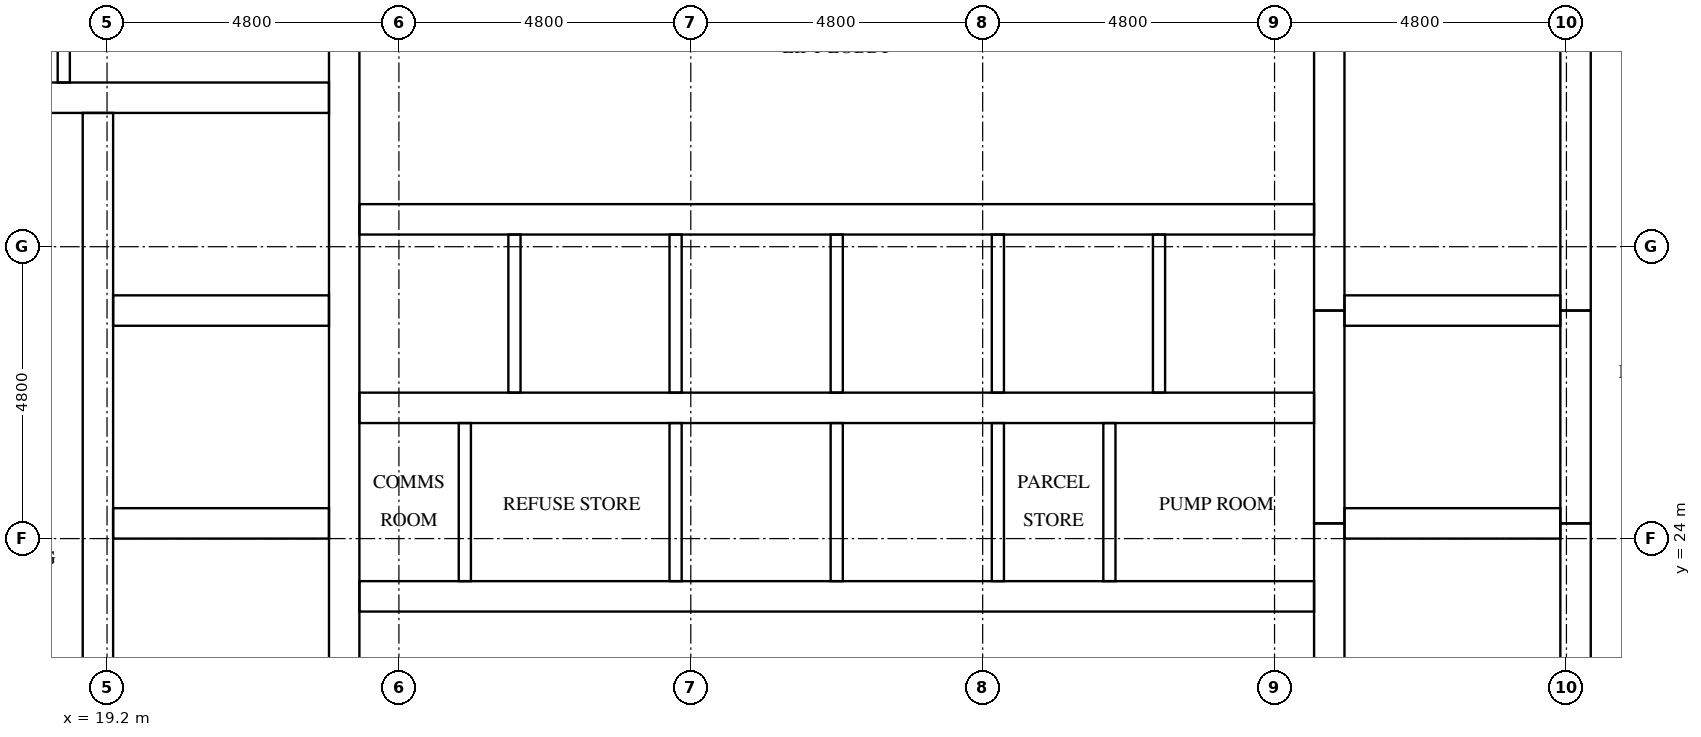
"""IFC4 building model, lengths in metres.
Left out: names, types, materials, properties, quantities, classifications, styles, units other than length and angle.
Written with IfcOpenShell. Run it as: python <this file> out.ifc"""

import sys

from ifc_helpers import new_model, si_unit, direction, frame, frame_2d, origin, place, context, subcontext, project, spatial, rectangle, extrude, element, fill, save


model = new_model("IFC4")
c1 = context("Model", 3, precision=1e-05, world=origin(), true_north=direction((0.0, 1.0)))
c2 = subcontext(c1, "Body", "Model", "MODEL_VIEW")
j1 = project(units=[si_unit("LENGTHUNIT", "METRE"), si_unit("PLANEANGLEUNIT", "RADIAN")], contexts=[c1])
p1 = place(None, origin())
s1 = spatial("IfcSite", under=j1, at=p1, CompositionType="ELEMENT")
p2 = place(p1, origin())
s2 = spatial("IfcBuilding", under=s1, at=p2, CompositionType="ELEMENT")
p3 = place(p2, frame((0.0, 0.0, 199.9)))
s3 = spatial("IfcBuildingStorey", under=s2, at=p3, CompositionType="ELEMENT", Elevation=199.9)
p4 = place(p3, frame((19.05, 15.7, 0.0), z_axis=(0.0, 0.0, 1.0), x_axis=(0.0, 1.0, 0.0)))
e1 = element("IfcWall", 1, at=p4, inside=s3, PredefinedType="SHEAR", context=c2, shape_type="SweptSolid", body=[
    extrude(rectangle(XDim=15.3, YDim=0.5, at=frame_2d((7.65, 0.0))), origin(), (0.0, 0.0, 1.0), 3.1),
])
p5 = place(p4, frame((9.75, 0.0, 0.0)))
e2 = element("IfcOpeningElement", 2, at=p5, cuts=e1, PredefinedType="OPENING", context=c2, shape_type="SweptSolid", body=[
    extrude(rectangle(XDim=1.1, YDim=2.1, at=frame_2d((0.55, 1.05))), frame((0.0, 0.26, 0.0), z_axis=(0.0, -1.0, 0.0), x_axis=(1.0, 0.0, 0.0)), (0.0, 0.0, 1.0), 0.52),
])
p6 = place(p4, frame((13.25, 0.0, 0.0)))
e3 = element("IfcOpeningElement", 3, at=p6, cuts=e1, PredefinedType="OPENING", context=c2, shape_type="SweptSolid", body=[
    extrude(rectangle(XDim=1.1, YDim=2.1, at=frame_2d((0.55, 1.05))), frame((0.0, 0.26, 0.0), z_axis=(0.0, -1.0, 0.0), x_axis=(1.0, 0.0, 0.0)), (0.0, 0.0, 1.0), 0.52),
])
p7 = place(p4, frame((0.5, 0.0, 0.0)))
e4 = element("IfcOpeningElement", 4, at=p7, cuts=e1, PredefinedType="OPENING", context=c2, shape_type="SweptSolid", body=[
    extrude(rectangle(XDim=1.2, YDim=2.1, at=frame_2d((0.6, 1.05))), frame((0.0, 0.26, 0.0), z_axis=(0.0, -1.0, 0.0), x_axis=(1.0, 0.0, 0.0)), (0.0, 0.0, 1.0), 0.52),
])
p8 = place(p3, frame((23.1, 15.7, 0.0), z_axis=(0.0, 0.0, 1.0), x_axis=(0.0, 1.0, 0.0)))
e5 = element("IfcWall", 5, at=p8, inside=s3, PredefinedType="SHEAR", context=c2, shape_type="SweptSolid", body=[
    extrude(rectangle(XDim=21.4, YDim=0.5, at=frame_2d((10.7, 0.0))), origin(), (0.0, 0.0, 1.0), 3.1),
])
p9 = place(p3, frame((39.3, 15.7, 0.0), z_axis=(0.0, 0.0, 1.0), x_axis=(0.0, 1.0, 0.0)))
e6 = element("IfcWall", 6, at=p9, inside=s3, PredefinedType="SHEAR", context=c2, shape_type="SweptSolid", body=[
    extrude(rectangle(XDim=8.55, YDim=0.5, at=frame_2d((4.275, 0.0))), origin(), (0.0, 0.0, 1.0), 3.1),
])
p10 = place(p3, frame((39.3, 24.25, 0.0), z_axis=(0.0, 0.0, 1.0), x_axis=(0.0, 1.0, 0.0)))
e7 = element("IfcWall", 7, at=p10, inside=s3, PredefinedType="SHEAR", context=c2, shape_type="SweptSolid", body=[
    extrude(rectangle(XDim=3.5, YDim=0.5, at=frame_2d((1.75, 0.0))), origin(), (0.0, 0.0, 1.0), 3.1),
])
p11 = place(p3, frame((39.3, 27.75, 0.0), z_axis=(0.0, 0.0, 1.0), x_axis=(0.0, 1.0, 0.0)))
e8 = element("IfcWall", 8, at=p11, inside=s3, PredefinedType="SHEAR", context=c2, shape_type="SweptSolid", body=[
    extrude(rectangle(XDim=9.35, YDim=0.5, at=frame_2d((4.675, 0.0))), origin(), (0.0, 0.0, 1.0), 3.1),
])
p12 = place(p3, frame((43.35, 15.7, 0.0), z_axis=(0.0, 0.0, 1.0), x_axis=(0.0, 1.0, 0.0)))
e9 = element("IfcWall", 9, at=p12, inside=s3, PredefinedType="SHEAR", context=c2, shape_type="SweptSolid", body=[
    extrude(rectangle(XDim=8.55, YDim=0.5, at=frame_2d((4.275, 0.0))), origin(), (0.0, 0.0, 1.0), 3.1),
])
p13 = place(p12, frame((0.5, 0.0, 0.0)))
e10 = element("IfcOpeningElement", 10, at=p13, cuts=e9, PredefinedType="OPENING", context=c2, shape_type="SweptSolid", body=[
    extrude(rectangle(XDim=1.2, YDim=2.1, at=frame_2d((0.6, 1.05))), frame((0.0, 0.26, 0.0), z_axis=(0.0, -1.0, 0.0), x_axis=(1.0, 0.0, 0.0)), (0.0, 0.0, 1.0), 0.52),
])
p14 = place(p3, frame((43.35, 24.25, 0.0), z_axis=(0.0, 0.0, 1.0), x_axis=(0.0, 1.0, 0.0)))
e11 = element("IfcWall", 11, at=p14, inside=s3, PredefinedType="SHEAR", context=c2, shape_type="SweptSolid", body=[
    extrude(rectangle(XDim=3.5, YDim=0.5, at=frame_2d((1.75, 0.0))), origin(), (0.0, 0.0, 1.0), 3.1),
])
p15 = place(p14, frame((1.2, 0.0, 0.0)))
e12 = element("IfcOpeningElement", 12, at=p15, cuts=e11, PredefinedType="OPENING", context=c2, shape_type="SweptSolid", body=[
    extrude(rectangle(XDim=1.1, YDim=2.1, at=frame_2d((0.55, 1.05))), frame((0.0, 0.26, 0.0), z_axis=(0.0, -1.0, 0.0), x_axis=(1.0, 0.0, 0.0)), (0.0, 0.0, 1.0), 0.52),
])
p16 = place(p3, frame((43.35, 27.75, 0.0), z_axis=(0.0, 0.0, 1.0), x_axis=(0.0, 1.0, 0.0)))
e13 = element("IfcWall", 13, at=p16, inside=s3, PredefinedType="SHEAR", context=c2, shape_type="SweptSolid", body=[
    extrude(rectangle(XDim=9.35, YDim=0.5, at=frame_2d((4.675, 0.0))), origin(), (0.0, 0.0, 1.0), 3.1),
])
p17 = place(p16, frame((7.65, 0.0, 0.0)))
e14 = element("IfcOpeningElement", 14, at=p17, cuts=e13, PredefinedType="OPENING", context=c2, shape_type="SweptSolid", body=[
    extrude(rectangle(XDim=1.2, YDim=2.1, at=frame_2d((0.6, 1.05))), frame((0.0, 0.26, 0.0), z_axis=(0.0, -1.0, 0.0), x_axis=(1.0, 0.0, 0.0)), (0.0, 0.0, 1.0), 0.52),
])
for number, where, z_axis, x_axis in (
    (15, (19.3, 24.25, 0.0), (0.0, 0.0, 1.0), (1.0, 0.0, 0.0)),
    (16, (19.3, 27.75, 0.0), (0.0, 0.0, 1.0), (1.0, 0.0, 0.0)),
):
    element("IfcWall", number, at=place(p3, frame(where, z_axis=z_axis, x_axis=x_axis)), inside=s3, PredefinedType="SHEAR", context=c2, shape_type="SweptSolid", body=[
        extrude(rectangle(XDim=3.55, YDim=0.5, at=frame_2d((1.775, 0.0))), origin(), (0.0, 0.0, 1.0), 3.1),
    ])
p18 = place(p3, frame((15.7, 31.25, 0.0), z_axis=(0.0, 0.0, 1.0), x_axis=(1.0, 0.0, 0.0)))
e17 = element("IfcWall", 17, at=p18, inside=s3, PredefinedType="SHEAR", context=c2, shape_type="SweptSolid", body=[
    extrude(rectangle(XDim=7.15, YDim=0.5, at=frame_2d((3.575, 0.0))), origin(), (0.0, 0.0, 1.0), 3.1),
])
for number, where, z_axis, x_axis in (
    (18, (39.55, 24.25, 0.0), (0.0, 0.0, 1.0), (1.0, 0.0, 0.0)),
    (19, (39.55, 27.75, 0.0), (0.0, 0.0, 1.0), (1.0, 0.0, 0.0)),
):
    element("IfcWall", number, at=place(p3, frame(where, z_axis=z_axis, x_axis=x_axis)), inside=s3, PredefinedType="SHEAR", context=c2, shape_type="SweptSolid", body=[
        extrude(rectangle(XDim=3.55, YDim=0.5, at=frame_2d((1.775, 0.0))), origin(), (0.0, 0.0, 1.0), 3.1),
    ])
p19 = place(p3, frame((23.35, 23.05, 0.0), z_axis=(0.0, 0.0, 1.0), x_axis=(1.0, 0.0, 0.0)))
e20 = element("IfcWall", 20, at=p19, inside=s3, PredefinedType="SHEAR", context=c2, shape_type="SweptSolid", body=[
    extrude(rectangle(XDim=15.7, YDim=0.5, at=frame_2d((7.85, 0.0))), origin(), (0.0, 0.0, 1.0), 3.1),
])
p20 = place(p19, frame((0.317, 0.0, 0.0)))
e21 = element("IfcOpeningElement", 21, at=p20, cuts=e20, PredefinedType="OPENING", context=c2, shape_type="SweptSolid", body=[
    extrude(rectangle(XDim=1.0, YDim=2.1, at=frame_2d((0.5, 1.05))), frame((0.0, 0.26, 0.0), z_axis=(0.0, -1.0, 0.0), x_axis=(1.0, 0.0, 0.0)), (0.0, 0.0, 1.0), 0.52),
])
p21 = place(p19, frame((2.967, 0.0, 0.0)))
e22 = element("IfcOpeningElement", 22, at=p21, cuts=e20, PredefinedType="OPENING", context=c2, shape_type="SweptSolid", body=[
    extrude(rectangle(XDim=1.0, YDim=2.1, at=frame_2d((0.5, 1.05))), frame((0.0, 0.26, 0.0), z_axis=(0.0, -1.0, 0.0), x_axis=(1.0, 0.0, 0.0)), (0.0, 0.0, 1.0), 0.52),
])
p22 = place(p19, frame((10.917, 0.0, 0.0)))
e23 = element("IfcOpeningElement", 23, at=p22, cuts=e20, PredefinedType="OPENING", context=c2, shape_type="SweptSolid", body=[
    extrude(rectangle(XDim=1.0, YDim=2.1, at=frame_2d((0.5, 1.05))), frame((0.0, 0.26, 0.0), z_axis=(0.0, -1.0, 0.0), x_axis=(1.0, 0.0, 0.0)), (0.0, 0.0, 1.0), 0.52),
])
p23 = place(p19, frame((13.567, 0.0, 0.0)))
e24 = element("IfcOpeningElement", 24, at=p23, cuts=e20, PredefinedType="OPENING", context=c2, shape_type="SweptSolid", body=[
    extrude(rectangle(XDim=1.0, YDim=2.1, at=frame_2d((0.5, 1.05))), frame((0.0, 0.26, 0.0), z_axis=(0.0, -1.0, 0.0), x_axis=(1.0, 0.0, 0.0)), (0.0, 0.0, 1.0), 0.52),
])
p24 = place(p3, frame((23.35, 26.15, 0.0), z_axis=(0.0, 0.0, 1.0), x_axis=(1.0, 0.0, 0.0)))
e25 = element("IfcWall", 25, at=p24, inside=s3, PredefinedType="SHEAR", context=c2, shape_type="SweptSolid", body=[
    extrude(rectangle(XDim=15.7, YDim=0.5, at=frame_2d((7.85, 0.0))), origin(), (0.0, 0.0, 1.0), 3.1),
])
p25 = place(p3, frame((23.35, 29.25, 0.0), z_axis=(0.0, 0.0, 1.0), x_axis=(1.0, 0.0, 0.0)))
e26 = element("IfcWall", 26, at=p25, inside=s3, PredefinedType="SHEAR", context=c2, shape_type="SweptSolid", body=[
    extrude(rectangle(XDim=15.7, YDim=0.5, at=frame_2d((7.85, 0.0))), origin(), (0.0, 0.0, 1.0), 3.1),
])
p26 = place(p25, frame((0.675, 0.0, 0.0)))
e27 = element("IfcOpeningElement", 27, at=p26, cuts=e26, PredefinedType="OPENING", context=c2, shape_type="SweptSolid", body=[
    extrude(rectangle(XDim=1.1, YDim=2.1, at=frame_2d((0.55, 1.05))), frame((0.0, 0.26, 0.0), z_axis=(0.0, -1.0, 0.0), x_axis=(1.0, 0.0, 0.0)), (0.0, 0.0, 1.0), 0.52),
])
p27 = place(p25, frame((3.325, 0.0, 0.0)))
e28 = element("IfcOpeningElement", 28, at=p27, cuts=e26, PredefinedType="OPENING", context=c2, shape_type="SweptSolid", body=[
    extrude(rectangle(XDim=1.1, YDim=2.1, at=frame_2d((0.55, 1.05))), frame((0.0, 0.26, 0.0), z_axis=(0.0, -1.0, 0.0), x_axis=(1.0, 0.0, 0.0)), (0.0, 0.0, 1.0), 0.52),
])
p28 = place(p25, frame((5.975, 0.0, 0.0)))
e29 = element("IfcOpeningElement", 29, at=p28, cuts=e26, PredefinedType="OPENING", context=c2, shape_type="SweptSolid", body=[
    extrude(rectangle(XDim=1.1, YDim=2.1, at=frame_2d((0.55, 1.05))), frame((0.0, 0.26, 0.0), z_axis=(0.0, -1.0, 0.0), x_axis=(1.0, 0.0, 0.0)), (0.0, 0.0, 1.0), 0.52),
])
p29 = place(p25, frame((8.625, 0.0, 0.0)))
e30 = element("IfcOpeningElement", 30, at=p29, cuts=e26, PredefinedType="OPENING", context=c2, shape_type="SweptSolid", body=[
    extrude(rectangle(XDim=1.1, YDim=2.1, at=frame_2d((0.55, 1.05))), frame((0.0, 0.26, 0.0), z_axis=(0.0, -1.0, 0.0), x_axis=(1.0, 0.0, 0.0)), (0.0, 0.0, 1.0), 0.52),
])
p30 = place(p25, frame((11.275, 0.0, 0.0)))
e31 = element("IfcOpeningElement", 31, at=p30, cuts=e26, PredefinedType="OPENING", context=c2, shape_type="SweptSolid", body=[
    extrude(rectangle(XDim=1.1, YDim=2.1, at=frame_2d((0.55, 1.05))), frame((0.0, 0.26, 0.0), z_axis=(0.0, -1.0, 0.0), x_axis=(1.0, 0.0, 0.0)), (0.0, 0.0, 1.0), 0.52),
])
p31 = place(p25, frame((13.925, 0.0, 0.0)))
e32 = element("IfcOpeningElement", 32, at=p31, cuts=e26, PredefinedType="OPENING", context=c2, shape_type="SweptSolid", body=[
    extrude(rectangle(XDim=1.1, YDim=2.1, at=frame_2d((0.55, 1.05))), frame((0.0, 0.26, 0.0), z_axis=(0.0, -1.0, 0.0), x_axis=(1.0, 0.0, 0.0)), (0.0, 0.0, 1.0), 0.52),
])
p32 = place(p3, frame((25.9, 26.4, 0.0), z_axis=(0.0, 0.0, 1.0), x_axis=(0.0, 1.0, 0.0)))
e33 = element("IfcWall", 33, at=p32, inside=s3, PredefinedType="SOLIDWALL", context=c2, shape_type="SweptSolid", body=[
    extrude(rectangle(XDim=2.6, YDim=0.2, at=frame_2d((1.3, 0.0))), origin(), (0.0, 0.0, 1.0), 3.1),
])
p33 = place(p3, frame((28.55, 23.3, 0.0), z_axis=(0.0, 0.0, 1.0), x_axis=(0.0, 1.0, 0.0)))
e34 = element("IfcWall", 34, at=p33, inside=s3, PredefinedType="SOLIDWALL", context=c2, shape_type="SweptSolid", body=[
    extrude(rectangle(XDim=2.6, YDim=0.2, at=frame_2d((1.3, 0.0))), origin(), (0.0, 0.0, 1.0), 3.1),
])
p34 = place(p3, frame((28.55, 26.4, 0.0), z_axis=(0.0, 0.0, 1.0), x_axis=(0.0, 1.0, 0.0)))
e35 = element("IfcWall", 35, at=p34, inside=s3, PredefinedType="SOLIDWALL", context=c2, shape_type="SweptSolid", body=[
    extrude(rectangle(XDim=2.6, YDim=0.2, at=frame_2d((1.3, 0.0))), origin(), (0.0, 0.0, 1.0), 3.1),
])
p35 = place(p3, frame((31.2, 23.3, 0.0), z_axis=(0.0, 0.0, 1.0), x_axis=(0.0, 1.0, 0.0)))
e36 = element("IfcWall", 36, at=p35, inside=s3, PredefinedType="SOLIDWALL", context=c2, shape_type="SweptSolid", body=[
    extrude(rectangle(XDim=2.6, YDim=0.2, at=frame_2d((1.3, 0.0))), origin(), (0.0, 0.0, 1.0), 3.1),
])
p36 = place(p3, frame((31.2, 26.4, 0.0), z_axis=(0.0, 0.0, 1.0), x_axis=(0.0, 1.0, 0.0)))
e37 = element("IfcWall", 37, at=p36, inside=s3, PredefinedType="SOLIDWALL", context=c2, shape_type="SweptSolid", body=[
    extrude(rectangle(XDim=2.6, YDim=0.2, at=frame_2d((1.3, 0.0))), origin(), (0.0, 0.0, 1.0), 3.1),
])
p37 = place(p3, frame((33.85, 23.3, 0.0), z_axis=(0.0, 0.0, 1.0), x_axis=(0.0, 1.0, 0.0)))
e38 = element("IfcWall", 38, at=p37, inside=s3, PredefinedType="SOLIDWALL", context=c2, shape_type="SweptSolid", body=[
    extrude(rectangle(XDim=2.6, YDim=0.2, at=frame_2d((1.3, 0.0))), origin(), (0.0, 0.0, 1.0), 3.1),
])
for number, where, z_axis, x_axis in (
    (39, (33.85, 26.4, 0.0), (0.0, 0.0, 1.0), (0.0, 1.0, 0.0)),
    (40, (36.5, 26.4, 0.0), (0.0, 0.0, 1.0), (0.0, 1.0, 0.0)),
):
    element("IfcWall", number, at=place(p3, frame(where, z_axis=z_axis, x_axis=x_axis)), inside=s3, PredefinedType="SOLIDWALL", context=c2, shape_type="SweptSolid", body=[
        extrude(rectangle(XDim=2.6, YDim=0.2, at=frame_2d((1.3, 0.0))), origin(), (0.0, 0.0, 1.0), 3.1),
    ])
p38 = place(p3, frame((18.489, 31.5, 0.0), z_axis=(0.0, 0.0, 1.0), x_axis=(0.0, 1.0, 0.0)))
e41 = element("IfcWall", 41, at=p38, inside=s3, PredefinedType="PARTITIONING", context=c2, shape_type="SweptSolid", body=[
    extrude(rectangle(XDim=5.6, YDim=0.2, at=frame_2d((2.8, 0.0))), origin(), (0.0, 0.0, 1.0), 3.1),
])
for number, where, z_axis, x_axis in (
    (42, (25.084, 23.3, 0.0), (0.0, 0.0, 1.0), (0.0, 1.0, 0.0)),
    (43, (35.684, 23.3, 0.0), (0.0, 0.0, 1.0), (0.0, 1.0, 0.0)),
):
    element("IfcWall", number, at=place(p3, frame(where, z_axis=z_axis, x_axis=x_axis)), inside=s3, PredefinedType="PARTITIONING", context=c2, shape_type="SweptSolid", body=[
        extrude(rectangle(XDim=2.6, YDim=0.2, at=frame_2d((1.3, 0.0))), origin(), (0.0, 0.0, 1.0), 3.1),
    ])
p39 = place(p26, origin())
e44 = element("IfcDoor", 44, at=p39, inside=s3, OperationType="DOUBLE_DOOR_SLIDING", PredefinedType="DOOR", context=c2, shape_type="SweptSolid", body=[
    extrude(rectangle(XDim=1.1, YDim=2.1, at=frame_2d((0.55, 1.05))), frame((0.0, 0.025, 0.0), z_axis=(0.0, -1.0, 0.0), x_axis=(1.0, 0.0, 0.0)), (0.0, 0.0, 1.0), 0.05),
])
fill(e27, e44)
p40 = place(p27, origin())
e45 = element("IfcDoor", 45, at=p40, inside=s3, OperationType="DOUBLE_DOOR_SLIDING", PredefinedType="DOOR", context=c2, shape_type="SweptSolid", body=[
    extrude(rectangle(XDim=1.1, YDim=2.1, at=frame_2d((0.55, 1.05))), frame((0.0, 0.025, 0.0), z_axis=(0.0, -1.0, 0.0), x_axis=(1.0, 0.0, 0.0)), (0.0, 0.0, 1.0), 0.05),
])
fill(e28, e45)
p41 = place(p28, origin())
e46 = element("IfcDoor", 46, at=p41, inside=s3, OperationType="DOUBLE_DOOR_SLIDING", PredefinedType="DOOR", context=c2, shape_type="SweptSolid", body=[
    extrude(rectangle(XDim=1.1, YDim=2.1, at=frame_2d((0.55, 1.05))), frame((0.0, 0.025, 0.0), z_axis=(0.0, -1.0, 0.0), x_axis=(1.0, 0.0, 0.0)), (0.0, 0.0, 1.0), 0.05),
])
fill(e29, e46)
p42 = place(p29, origin())
e47 = element("IfcDoor", 47, at=p42, inside=s3, OperationType="DOUBLE_DOOR_SLIDING", PredefinedType="DOOR", context=c2, shape_type="SweptSolid", body=[
    extrude(rectangle(XDim=1.1, YDim=2.1, at=frame_2d((0.55, 1.05))), frame((0.0, 0.025, 0.0), z_axis=(0.0, -1.0, 0.0), x_axis=(1.0, 0.0, 0.0)), (0.0, 0.0, 1.0), 0.05),
])
fill(e30, e47)
p43 = place(p30, origin())
e48 = element("IfcDoor", 48, at=p43, inside=s3, OperationType="DOUBLE_DOOR_SLIDING", PredefinedType="DOOR", context=c2, shape_type="SweptSolid", body=[
    extrude(rectangle(XDim=1.1, YDim=2.1, at=frame_2d((0.55, 1.05))), frame((0.0, 0.025, 0.0), z_axis=(0.0, -1.0, 0.0), x_axis=(1.0, 0.0, 0.0)), (0.0, 0.0, 1.0), 0.05),
])
fill(e31, e48)
p44 = place(p31, origin())
e49 = element("IfcDoor", 49, at=p44, inside=s3, OperationType="DOUBLE_DOOR_SLIDING", PredefinedType="DOOR", context=c2, shape_type="SweptSolid", body=[
    extrude(rectangle(XDim=1.1, YDim=2.1, at=frame_2d((0.55, 1.05))), frame((0.0, 0.025, 0.0), z_axis=(0.0, -1.0, 0.0), x_axis=(1.0, 0.0, 0.0)), (0.0, 0.0, 1.0), 0.05),
])
fill(e32, e49)
p45 = place(p5, origin())
e50 = element("IfcDoor", 50, at=p45, inside=s3, OperationType="DOUBLE_DOOR_SLIDING", PredefinedType="DOOR", context=c2, shape_type="SweptSolid", body=[
    extrude(rectangle(XDim=1.1, YDim=2.1, at=frame_2d((0.55, 1.05))), frame((0.0, 0.025, 0.0), z_axis=(0.0, -1.0, 0.0), x_axis=(1.0, 0.0, 0.0)), (0.0, 0.0, 1.0), 0.05),
])
fill(e2, e50)
p46 = place(p6, origin())
e51 = element("IfcDoor", 51, at=p46, inside=s3, OperationType="DOUBLE_DOOR_SLIDING", PredefinedType="DOOR", context=c2, shape_type="SweptSolid", body=[
    extrude(rectangle(XDim=1.1, YDim=2.1, at=frame_2d((0.55, 1.05))), frame((0.0, 0.025, 0.0), z_axis=(0.0, -1.0, 0.0), x_axis=(1.0, 0.0, 0.0)), (0.0, 0.0, 1.0), 0.05),
])
fill(e3, e51)
p47 = place(p15, origin())
e52 = element("IfcDoor", 52, at=p47, inside=s3, OperationType="DOUBLE_DOOR_SLIDING", PredefinedType="DOOR", context=c2, shape_type="SweptSolid", body=[
    extrude(rectangle(XDim=1.1, YDim=2.1, at=frame_2d((0.55, 1.05))), frame((0.0, 0.025, 0.0), z_axis=(0.0, -1.0, 0.0), x_axis=(1.0, 0.0, 0.0)), (0.0, 0.0, 1.0), 0.05),
])
fill(e12, e52)
p48 = place(p20, frame((1.0, 0.0, 0.0), z_axis=(0.0, 0.0, 1.0), x_axis=(-1.0, 0.0, 0.0)))
e53 = element("IfcDoor", 53, at=p48, inside=s3, OperationType="SINGLE_SWING_LEFT", PredefinedType="DOOR", context=c2, shape_type="SweptSolid", body=[
    extrude(rectangle(XDim=1.0, YDim=2.1, at=frame_2d((0.5, 1.05))), frame((0.0, 0.025, 0.0), z_axis=(0.0, -1.0, 0.0), x_axis=(1.0, 0.0, 0.0)), (0.0, 0.0, 1.0), 0.05),
])
fill(e21, e53)
p49 = place(p21, frame((1.0, 0.0, 0.0), z_axis=(0.0, 0.0, 1.0), x_axis=(-1.0, 0.0, 0.0)))
e54 = element("IfcDoor", 54, at=p49, inside=s3, OperationType="SINGLE_SWING_RIGHT", PredefinedType="DOOR", context=c2, shape_type="SweptSolid", body=[
    extrude(rectangle(XDim=1.0, YDim=2.1, at=frame_2d((0.5, 1.05))), frame((0.0, 0.025, 0.0), z_axis=(0.0, -1.0, 0.0), x_axis=(1.0, 0.0, 0.0)), (0.0, 0.0, 1.0), 0.05),
])
fill(e22, e54)
p50 = place(p22, frame((1.0, 0.0, 0.0), z_axis=(0.0, 0.0, 1.0), x_axis=(-1.0, 0.0, 0.0)))
e55 = element("IfcDoor", 55, at=p50, inside=s3, OperationType="SINGLE_SWING_LEFT", PredefinedType="DOOR", context=c2, shape_type="SweptSolid", body=[
    extrude(rectangle(XDim=1.0, YDim=2.1, at=frame_2d((0.5, 1.05))), frame((0.0, 0.025, 0.0), z_axis=(0.0, -1.0, 0.0), x_axis=(1.0, 0.0, 0.0)), (0.0, 0.0, 1.0), 0.05),
])
fill(e23, e55)
p51 = place(p23, frame((1.0, 0.0, 0.0), z_axis=(0.0, 0.0, 1.0), x_axis=(-1.0, 0.0, 0.0)))
e56 = element("IfcDoor", 56, at=p51, inside=s3, OperationType="SINGLE_SWING_RIGHT", PredefinedType="DOOR", context=c2, shape_type="SweptSolid", body=[
    extrude(rectangle(XDim=1.0, YDim=2.1, at=frame_2d((0.5, 1.05))), frame((0.0, 0.025, 0.0), z_axis=(0.0, -1.0, 0.0), x_axis=(1.0, 0.0, 0.0)), (0.0, 0.0, 1.0), 0.05),
])
fill(e24, e56)
save(model, sys.argv[1])
